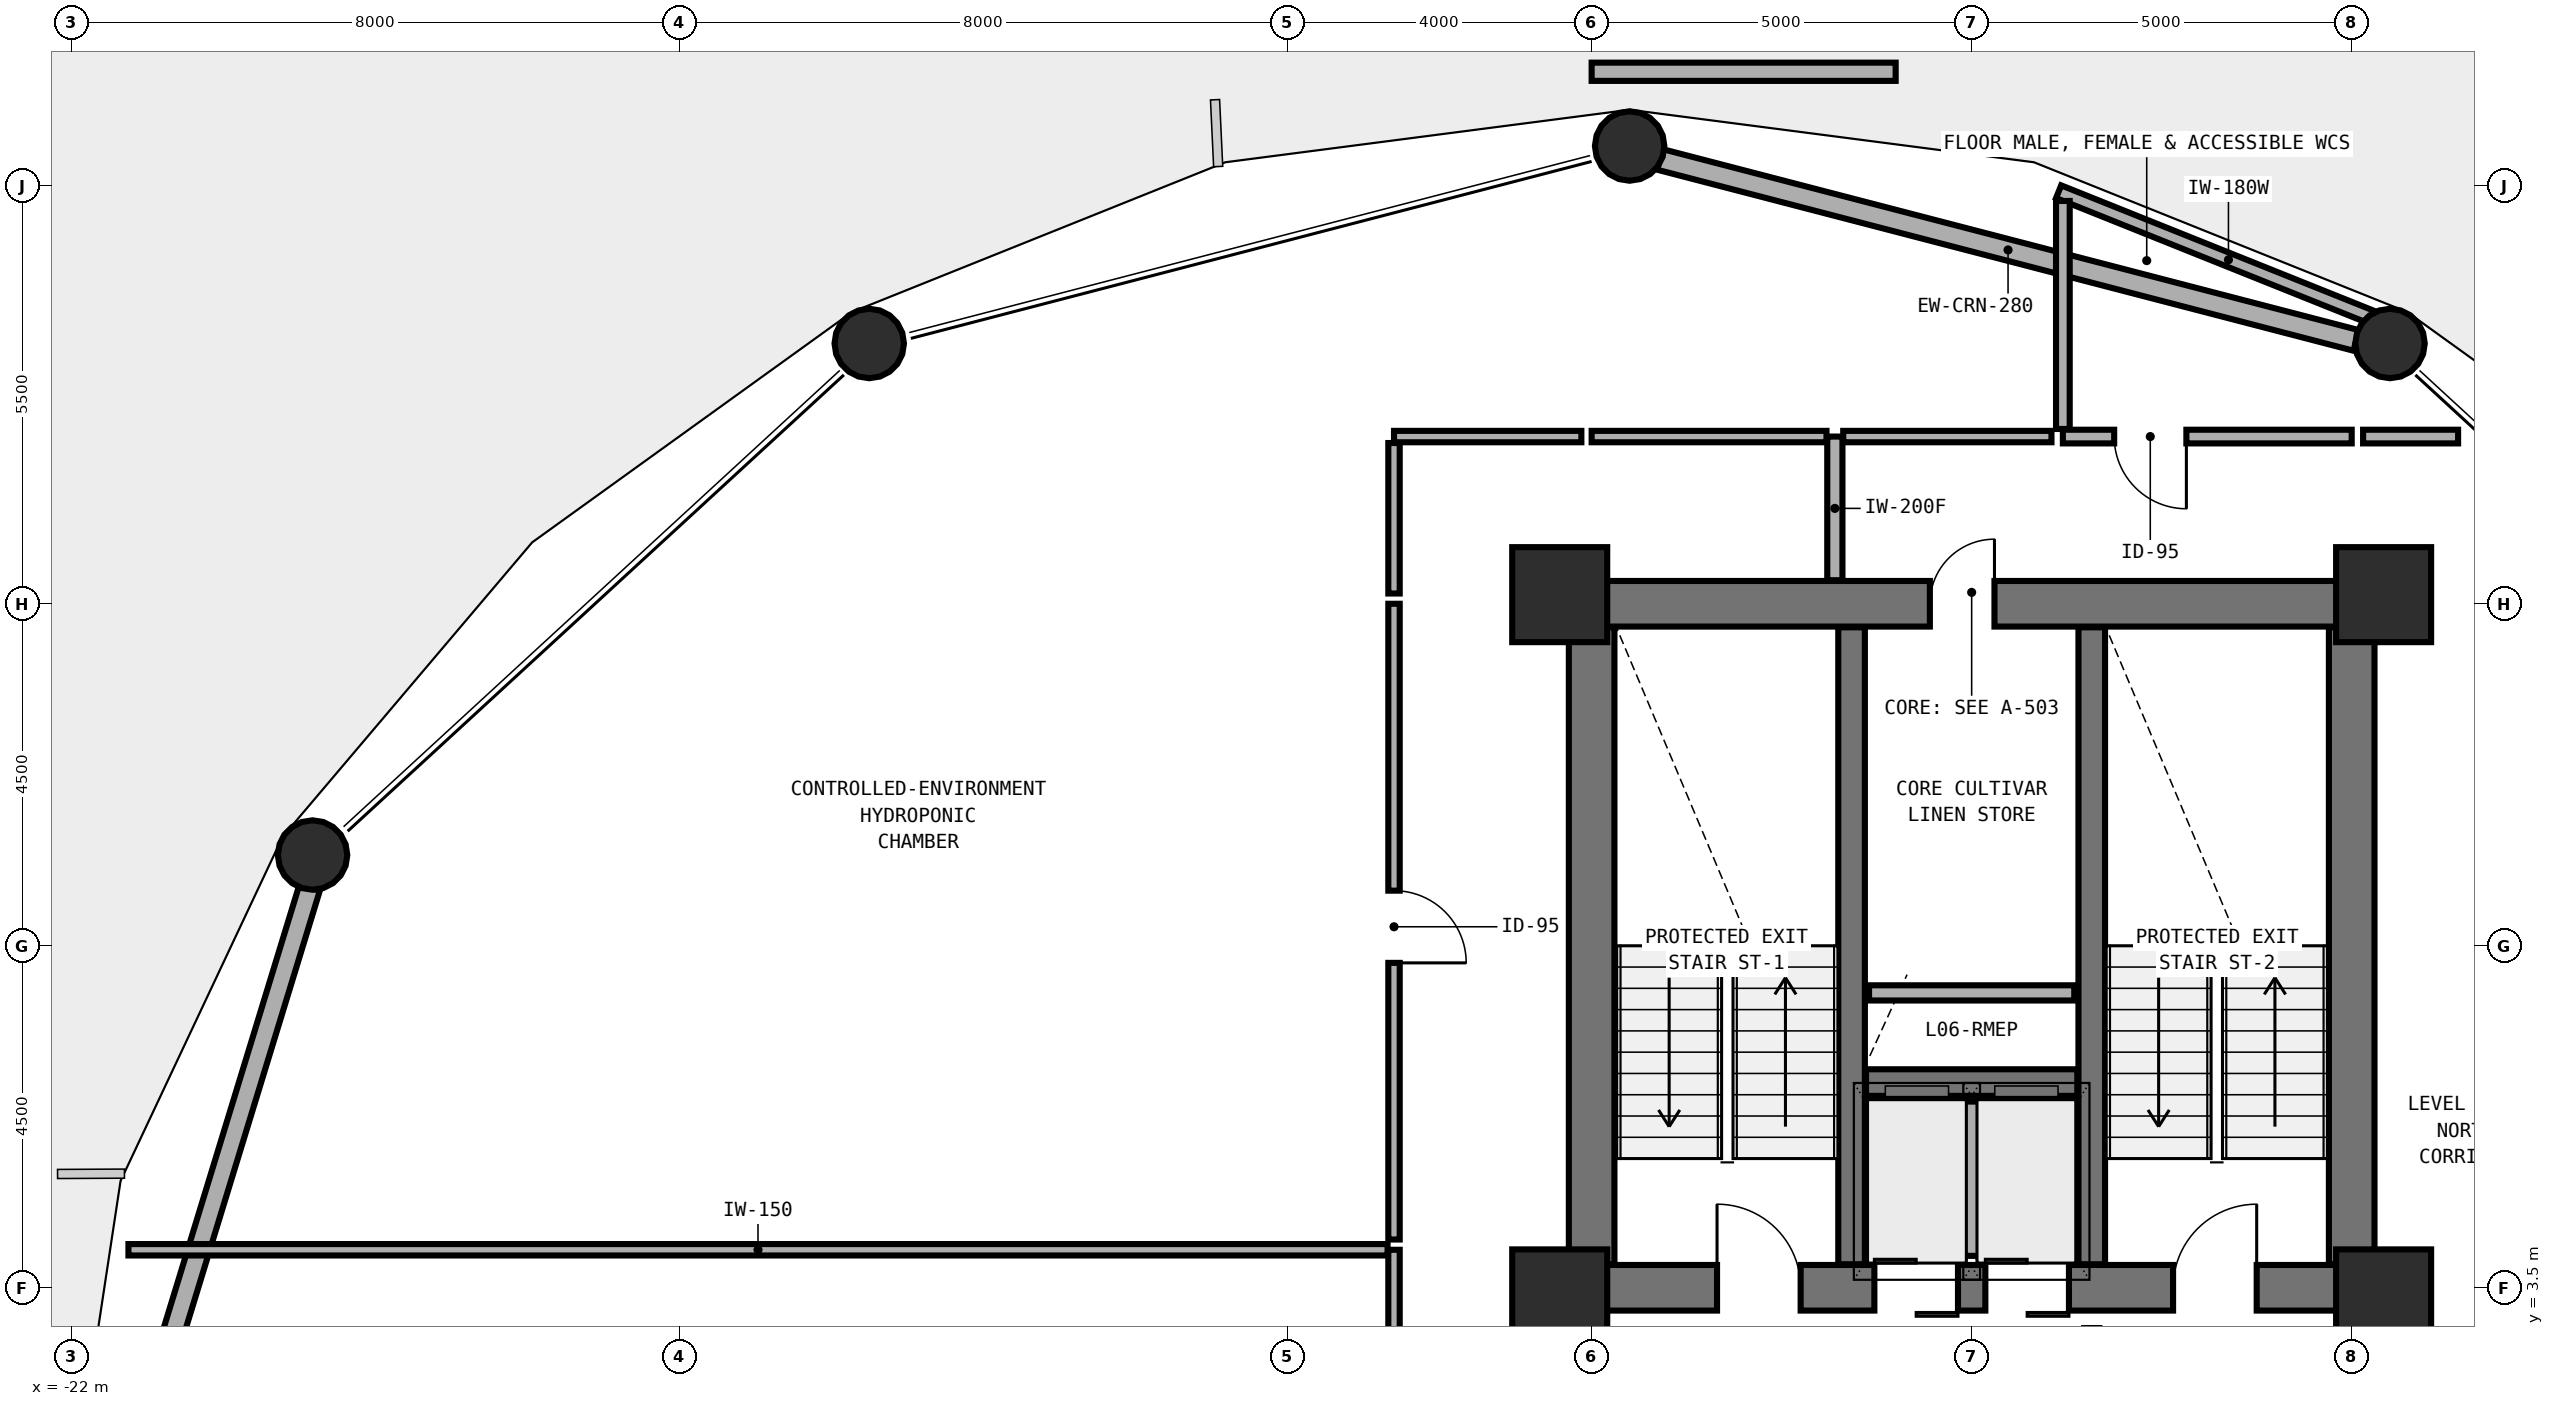
"""IFC4 building model, lengths in metres.
Left out: names, types, materials, properties, quantities, classifications, styles, units other than length and angle.
Written with IfcOpenShell. Run it as: python <this file> out.ifc"""

import sys

from ifc_helpers import new_model, si_unit, direction, frame, frame_2d, origin, origin_2d, place, context, subcontext, project, spatial, rectangle, hollow_circle, extrude, element, fill, save


model = new_model("IFC4")
c1 = context("Model", 3, precision=1e-05, world=origin(), true_north=direction((0.0, 1.0)))
c2 = subcontext(c1, "Body", "Model", "MODEL_VIEW")
j1 = project(units=[si_unit("LENGTHUNIT", "METRE"), si_unit("PLANEANGLEUNIT", "RADIAN")], contexts=[c1])
p1 = place(None, origin())
s1 = spatial("IfcSite", under=j1, at=p1, CompositionType="ELEMENT")
p2 = place(p1, origin())
s2 = spatial("IfcBuilding", under=s1, at=p2, CompositionType="ELEMENT")
p3 = place(p2, frame((0.0, 0.0, 27.6)))
s3 = spatial("IfcBuildingStorey", under=s2, at=p3, CompositionType="ELEMENT", Elevation=27.6)
p4 = place(p3, frame((-2.0, 3.5, 0.0), z_axis=(0.0, 0.0, 1.0), x_axis=(1.0, 0.0, 0.0)))
e1 = element("IfcWall", 1, at=p4, inside=s3, PredefinedType="SHEAR", context=c2, shape_type="SweptSolid", body=[
    extrude(rectangle(XDim=10.0, YDim=0.6, at=frame_2d((5.0, 0.0))), origin(), (0.0, 0.0, 1.0), 3.892),
])
p5 = place(p4, frame((1.65, 0.0, 0.0)))
e2 = element("IfcOpeningElement", 2, at=p5, cuts=e1, PredefinedType="OPENING", context=c2, shape_type="SweptSolid", body=[
    extrude(rectangle(XDim=1.1, YDim=2.15, at=frame_2d((0.55, 1.075))), frame((0.0, 0.31, 0.0), z_axis=(0.0, -1.0, 0.0), x_axis=(1.0, 0.0, 0.0)), (0.0, 0.0, 1.0), 0.62),
])
p6 = place(p4, frame((7.65, 0.0, 0.0)))
e3 = element("IfcOpeningElement", 3, at=p6, cuts=e1, PredefinedType="OPENING", context=c2, shape_type="SweptSolid", body=[
    extrude(rectangle(XDim=1.1, YDim=2.15, at=frame_2d((0.55, 1.075))), frame((0.0, 0.31, 0.0), z_axis=(0.0, -1.0, 0.0), x_axis=(1.0, 0.0, 0.0)), (0.0, 0.0, 1.0), 0.62),
])
p7 = place(p4, frame((3.72, 0.0, 0.0)))
e4 = element("IfcOpeningElement", 4, at=p7, cuts=e1, PredefinedType="OPENING", context=c2, shape_type="SweptSolid", body=[
    extrude(rectangle(XDim=1.1, YDim=2.2, at=frame_2d((0.55, 1.1))), frame((0.0, 0.31, 0.0), z_axis=(0.0, -1.0, 0.0), x_axis=(1.0, 0.0, 0.0)), (0.0, 0.0, 1.0), 0.62),
])
p8 = place(p4, frame((5.18, 0.0, 0.0)))
e5 = element("IfcOpeningElement", 5, at=p8, cuts=e1, PredefinedType="OPENING", context=c2, shape_type="SweptSolid", body=[
    extrude(rectangle(XDim=1.1, YDim=2.2, at=frame_2d((0.55, 1.1))), frame((0.0, 0.31, 0.0), z_axis=(0.0, -1.0, 0.0), x_axis=(1.0, 0.0, 0.0)), (0.0, 0.0, 1.0), 0.62),
])
p9 = place(p3, frame((-2.0, 12.5, 0.0), z_axis=(0.0, 0.0, 1.0), x_axis=(1.0, 0.0, 0.0)))
e6 = element("IfcWall", 6, at=p9, inside=s3, PredefinedType="SHEAR", context=c2, shape_type="SweptSolid", body=[
    extrude(rectangle(XDim=10.0, YDim=0.6, at=frame_2d((5.0, 0.0))), origin(), (0.0, 0.0, 1.0), 3.892),
])
p10 = place(p9, frame((4.45, 0.0, 0.0)))
e7 = element("IfcOpeningElement", 7, at=p10, cuts=e6, PredefinedType="OPENING", context=c2, shape_type="SweptSolid", body=[
    extrude(rectangle(XDim=0.85, YDim=2.1, at=frame_2d((0.425, 1.05))), frame((0.0, 0.31, 0.0), z_axis=(0.0, -1.0, 0.0), x_axis=(1.0, 0.0, 0.0)), (0.0, 0.0, 1.0), 0.62),
])
for number, where, z_axis, x_axis in (
    (8, (-2.0, 3.81, 0.0), (0.0, 0.0, 1.0), (0.0, 1.0, 0.0)),
    (9, (8.0, 3.81, 0.0), (0.0, 0.0, 1.0), (0.0, 1.0, 0.0)),
):
    element("IfcWall", number, at=place(p3, frame(where, z_axis=z_axis, x_axis=x_axis)), inside=s3, PredefinedType="SHEAR", context=c2, shape_type="SweptSolid", body=[
        extrude(rectangle(XDim=8.38, YDim=0.6, at=frame_2d((4.19, 0.0))), origin(), (0.0, 0.0, 1.0), 3.892),
    ])
for number, where, z_axis, x_axis in (
    (10, (1.42, 3.81, 0.0), (0.0, 0.0, 1.0), (0.0, 1.0, 0.0)),
    (11, (4.58, 3.81, 0.0), (0.0, 0.0, 1.0), (0.0, 1.0, 0.0)),
):
    element("IfcWall", number, at=place(p3, frame(where, z_axis=z_axis, x_axis=x_axis)), inside=s3, PredefinedType="SHEAR", context=c2, shape_type="SweptSolid", body=[
        extrude(rectangle(XDim=8.38, YDim=0.35, at=frame_2d((4.19, 0.0))), origin(), (0.0, 0.0, 1.0), 3.892),
    ])
p11 = place(p3, frame((1.61, 6.2, 0.0), z_axis=(0.0, 0.0, 1.0), x_axis=(1.0, 0.0, 0.0)))
e12 = element("IfcWall", 12, at=p11, inside=s3, PredefinedType="SHEAR", context=c2, shape_type="SweptSolid", body=[
    extrude(rectangle(XDim=2.78, YDim=0.35, at=frame_2d((1.39, 0.0))), origin(), (0.0, 0.0, 1.0), 3.892),
])
for number, where, z_axis, x_axis in (
    (13, (-2.42, 12.62, 0.0), (0.0, 0.0, 1.0), (1.0, 0.0, 0.0)),
    (14, (8.42, 12.62, 0.0), (0.0, 0.0, 1.0), (1.0, 0.0, 0.0)),
    (15, (-2.42, 3.38, 0.0), (0.0, 0.0, 1.0), (1.0, 0.0, 0.0)),
    (16, (8.42, 3.38, 0.0), (0.0, 0.0, 1.0), (1.0, 0.0, 0.0)),
):
    element("IfcColumn", number, at=place(p3, frame(where, z_axis=z_axis, x_axis=x_axis)), inside=s3, PredefinedType="COLUMN", context=c2, shape_type="SweptSolid", body=[
        extrude(rectangle(XDim=1.25, YDim=1.25, at=origin_2d()), origin(), (0.0, 0.0, 1.0), 3.875),
    ])
p12 = place(p3, frame((8.458, 15.861, 0.0), z_axis=(0.024236523215, 0.032609140326, 0.999174276545), x_axis=(-0.802595483818, 0.596523670406, 0.0)))
e17 = element("IfcColumn", 17, at=p12, inside=s3, PredefinedType="COLUMN", context=c2, shape_type="SweptSolid", body=[
    extrude(hollow_circle(Radius=0.457, WallThickness=0.032, at=origin_2d()), origin(), (0.0, 0.0, 1.0), 3.878),
])
p13 = place(p3, frame((-1.5, 18.45, 0.0), z_axis=(0.0, 0.037649698668, 0.999290998754), x_axis=(-1.0, 0.0, 0.0)))
e18 = element("IfcColumn", 18, at=p13, inside=s3, PredefinedType="COLUMN", context=c2, shape_type="SweptSolid", body=[
    extrude(hollow_circle(Radius=0.457, WallThickness=0.032, at=origin_2d()), origin(), (0.0, 0.0, 1.0), 3.878),
])
p14 = place(p3, frame((-11.458, 15.861, 0.0), z_axis=(-0.024236523215, 0.032609140326, 0.999174276545), x_axis=(-0.802595483818, -0.596523670406, 0.0)))
e19 = element("IfcColumn", 19, at=p14, inside=s3, PredefinedType="COLUMN", context=c2, shape_type="SweptSolid", body=[
    extrude(hollow_circle(Radius=0.457, WallThickness=0.032, at=origin_2d()), origin(), (0.0, 0.0, 1.0), 3.878),
])
p15 = place(p3, frame((-18.747, 9.157, 0.0), z_axis=(-0.041979196917, 0.018818260687, 0.998941249569), x_axis=(-0.409055904093, -0.912509324515, 0.0)))
e20 = element("IfcColumn", 20, at=p15, inside=s3, PredefinedType="COLUMN", context=c2, shape_type="SweptSolid", body=[
    extrude(hollow_circle(Radius=0.457, WallThickness=0.032, at=origin_2d()), origin(), (0.0, 0.0, 1.0), 3.879),
])
p16 = place(p3, frame((-2.0, 19.5, 0.0), z_axis=(0.0, 0.0, 1.0), x_axis=(1.0, 0.0, 0.0)))
e21 = element("IfcWall", 21, at=p16, inside=s3, PredefinedType="PARAPET", context=c2, shape_type="SweptSolid", body=[
    extrude(rectangle(XDim=4.0, YDim=0.24, at=frame_2d((2.0, 0.0))), origin(), (0.0, 0.0, 1.0), 0.55),
])
p17 = place(p3, frame((-1.101, 18.346, 0.0), z_axis=(0.0, 0.0, 1.0), x_axis=(0.967836325918, -0.251580695274, 0.0)))
e22 = element("IfcWall", 22, at=p17, inside=s3, PredefinedType="SOLIDWALL", context=c2, shape_type="SweptSolid", body=[
    extrude(rectangle(XDim=9.465, YDim=0.28, at=frame_2d((4.732, 0.0))), origin(), (0.0, 0.0, 1.0), 3.06),
])
p18 = place(p3, frame((-21.429, 0.394, 0.0), z_axis=(0.0, 0.0, 1.0), x_axis=(0.292709587844, 0.956201389449, 0.0)))
e23 = element("IfcWall", 23, at=p18, inside=s3, PredefinedType="SOLIDWALL", context=c2, shape_type="SweptSolid", body=[
    extrude(rectangle(XDim=8.753, YDim=0.28, at=frame_2d((4.376, 0.0))), origin(), (0.0, 0.0, 1.0), 3.06),
])
p19 = place(p3, frame((3.0, 3.92, 0.0), z_axis=(0.0, 0.0, 1.0), x_axis=(0.0, 1.0, 0.0)))
e24 = element("IfcWall", 24, at=p19, inside=s3, PredefinedType="SOLIDWALL", context=c2, shape_type="SweptSolid", body=[
    extrude(rectangle(XDim=2.03, YDim=0.2, at=frame_2d((1.015, 0.0))), origin(), (0.0, 0.0, 1.0), 3.64),
])
p20 = place(p3, frame((1.65, 7.38, 0.0), z_axis=(0.0, 0.0, 1.0), x_axis=(1.0, 0.0, 0.0)))
e25 = element("IfcWall", 25, at=p20, inside=s3, PredefinedType="SOLIDWALL", context=c2, shape_type="SweptSolid", body=[
    extrude(rectangle(XDim=2.7, YDim=0.2, at=frame_2d((1.35, 0.0))), origin(), (0.0, 0.0, 1.0), 3.64),
])
p21 = place(p3, frame((8.0, 14.7, 0.0), z_axis=(0.0, 0.0, 1.0), x_axis=(-1.0, 0.0, 0.0)))
e26 = element("IfcWall", 26, at=p21, inside=s3, PredefinedType="PLUMBINGWALL", context=c2, shape_type="SweptSolid", body=[
    extrude(rectangle(XDim=3.8, YDim=0.18, at=frame_2d((1.9, 0.0))), origin(), (0.0, 0.0, 1.0), 3.122),
])
p22 = place(p21, frame((2.175, 0.0, 0.0)))
e27 = element("IfcOpeningElement", 27, at=p22, cuts=e26, PredefinedType="OPENING", context=c2, shape_type="SweptSolid", body=[
    extrude(rectangle(XDim=0.95, YDim=2.1, at=frame_2d((0.475, 1.05))), frame((0.0, 0.1, 0.0), z_axis=(0.0, -1.0, 0.0), x_axis=(1.0, 0.0, 0.0)), (0.0, 0.0, 1.0), 0.2),
])
p23 = place(p3, frame((-4.6, 4.0, 0.0), z_axis=(0.0, 0.0, 1.0), x_axis=(0.0, -1.0, 0.0)))
e28 = element("IfcWall", 28, at=p23, inside=s3, PredefinedType="PARTITIONING", context=c2, shape_type="SweptSolid", body=[
    extrude(rectangle(XDim=10.6, YDim=0.15, at=frame_2d((5.3, 0.0))), origin(), (0.0, 0.0, 1.0), 3.64),
])
p24 = place(p23, frame((4.825, 0.0, 0.0)))
e29 = element("IfcOpeningElement", 29, at=p24, cuts=e28, PredefinedType="OPENING", context=c2, shape_type="SweptSolid", body=[
    extrude(rectangle(XDim=0.95, YDim=2.1, at=frame_2d((0.475, 1.05))), frame((0.0, 0.085, 0.0), z_axis=(0.0, -1.0, 0.0), x_axis=(1.0, 0.0, 0.0)), (0.0, 0.0, 1.0), 0.17),
])
p25 = place(p3, frame((-4.6, 12.5, 0.0), z_axis=(0.0, 0.0, 1.0), x_axis=(0.0, -1.0, 0.0)))
e30 = element("IfcWall", 30, at=p25, inside=s3, PredefinedType="PARTITIONING", context=c2, shape_type="SweptSolid", body=[
    extrude(rectangle(XDim=8.365, YDim=0.15, at=frame_2d((4.183, 0.0))), origin(), (0.0, 0.0, 1.0), 3.64),
])
p26 = place(p25, frame((3.775, 0.0, 0.0)))
e31 = element("IfcOpeningElement", 31, at=p26, cuts=e30, PredefinedType="OPENING", context=c2, shape_type="SweptSolid", body=[
    extrude(rectangle(XDim=0.95, YDim=2.1, at=frame_2d((0.475, 1.05))), frame((0.0, 0.085, 0.0), z_axis=(0.0, -1.0, 0.0), x_axis=(1.0, 0.0, 0.0)), (0.0, 0.0, 1.0), 0.17),
])
p27 = place(p3, frame((1.2, 14.7, 0.0), z_axis=(0.0, 0.0, 1.0), x_axis=(0.0, -1.0, 0.0)))
e32 = element("IfcWall", 32, at=p27, inside=s3, PredefinedType="MOVABLE", context=c2, shape_type="SweptSolid", body=[
    extrude(rectangle(XDim=1.89, YDim=0.2, at=frame_2d((0.945, 0.0))), origin(), (0.0, 0.0, 1.0), 3.64),
])
p28 = place(p3, frame((9.4, 14.7, 0.0), z_axis=(0.0, 0.0, 1.0), x_axis=(-1.0, 0.0, 0.0)))
e33 = element("IfcWall", 33, at=p28, inside=s3, PredefinedType="PLUMBINGWALL", context=c2, shape_type="SweptSolid", body=[
    extrude(rectangle(XDim=1.25, YDim=0.18, at=frame_2d((0.625, 0.0))), origin(), (0.0, 0.0, 1.0), 3.122),
])
p29 = place(p3, frame((-21.251, 4.0, 0.0), z_axis=(0.0, 0.0, 1.0), x_axis=(1.0, 0.0, 0.0)))
e34 = element("IfcWall", 34, at=p29, inside=s3, PredefinedType="PARTITIONING", context=c2, shape_type="SweptSolid", body=[
    extrude(rectangle(XDim=16.566, YDim=0.15, at=frame_2d((8.283, 0.0))), origin(), (0.0, 0.0, 1.0), 3.64),
])
p30 = place(p3, frame((1.09, 14.7, 0.0), z_axis=(0.0, 0.0, 1.0), x_axis=(-1.0, 0.0, 0.0)))
e35 = element("IfcWall", 35, at=p30, inside=s3, PredefinedType="PARTITIONING", context=c2, shape_type="SweptSolid", body=[
    extrude(rectangle(XDim=3.09, YDim=0.15, at=frame_2d((1.545, 0.0))), origin(), (0.0, 0.0, 1.0), 3.122),
])
p31 = place(p3, frame((-2.135, 14.7, 0.0), z_axis=(0.0, 0.0, 1.0), x_axis=(-1.0, 0.0, 0.0)))
e36 = element("IfcWall", 36, at=p31, inside=s3, PredefinedType="PARTITIONING", context=c2, shape_type="SweptSolid", body=[
    extrude(rectangle(XDim=2.465, YDim=0.15, at=frame_2d((1.232, 0.0))), origin(), (0.0, 0.0, 1.0), 3.122),
])
p32 = place(p3, frame((-4.6, 14.615, 0.0), z_axis=(0.0, 0.0, 1.0), x_axis=(0.0, -1.0, 0.0)))
e37 = element("IfcWall", 37, at=p32, inside=s3, PredefinedType="PARTITIONING", context=c2, shape_type="SweptSolid", body=[
    extrude(rectangle(XDim=1.98, YDim=0.15, at=frame_2d((0.99, 0.0))), origin(), (0.0, 0.0, 1.0), 3.64),
])
p33 = place(p3, frame((4.05, 14.7, 0.0), z_axis=(0.0, 0.0, 1.0), x_axis=(-1.0, 0.0, 0.0)))
e38 = element("IfcWall", 38, at=p33, inside=s3, PredefinedType="PARTITIONING", context=c2, shape_type="SweptSolid", body=[
    extrude(rectangle(XDim=2.74, YDim=0.15, at=frame_2d((1.37, 0.0))), origin(), (0.0, 0.0, 1.0), 3.122),
])
p34 = place(p3, frame((4.144, 17.922, 0.0), z_axis=(0.0, 0.0, 1.0), x_axis=(0.928144118183, -0.372221030952, 0.0)))
e39 = element("IfcWall", 39, at=p34, inside=s3, PredefinedType="PLUMBINGWALL", context=c2, shape_type="SweptSolid", body=[
    extrude(rectangle(XDim=4.815, YDim=0.18, at=frame_2d((2.407, 0.0))), origin(), (0.0, 0.0, 1.0), 3.072),
])
p35 = place(p3, frame((4.2, 17.8, 0.0), z_axis=(0.0, 0.0, 1.0), x_axis=(0.0, -1.0, 0.0)))
e40 = element("IfcWall", 40, at=p35, inside=s3, PredefinedType="PLUMBINGWALL", context=c2, shape_type="SweptSolid", body=[
    extrude(rectangle(XDim=3.0, YDim=0.18, at=frame_2d((1.5, 0.0))), origin(), (0.0, 0.0, 1.0), 3.64),
])
p36 = place(p5, origin())
e41 = element("IfcDoor", 41, at=p36, inside=s3, OperationType="SINGLE_SWING_LEFT", PredefinedType="DOOR", context=c2, shape_type="SweptSolid", body=[
    extrude(rectangle(XDim=1.1, YDim=2.15, at=frame_2d((0.55, 1.075))), frame((0.0, 0.025, 0.0), z_axis=(0.0, -1.0, 0.0), x_axis=(1.0, 0.0, 0.0)), (0.0, 0.0, 1.0), 0.05),
])
fill(e2, e41)
p37 = place(p6, origin())
e42 = element("IfcDoor", 42, at=p37, inside=s3, OperationType="SINGLE_SWING_RIGHT", PredefinedType="DOOR", context=c2, shape_type="SweptSolid", body=[
    extrude(rectangle(XDim=1.1, YDim=2.15, at=frame_2d((0.55, 1.075))), frame((0.0, 0.025, 0.0), z_axis=(0.0, -1.0, 0.0), x_axis=(1.0, 0.0, 0.0)), (0.0, 0.0, 1.0), 0.05),
])
fill(e3, e42)
p38 = place(p7, origin())
e43 = element("IfcDoor", 43, at=p38, inside=s3, OperationType="DOUBLE_DOOR_SLIDING", PredefinedType="DOOR", context=c2, shape_type="SweptSolid", body=[
    extrude(rectangle(XDim=1.1, YDim=2.2, at=frame_2d((0.55, 1.1))), frame((0.0, 0.025, 0.0), z_axis=(0.0, -1.0, 0.0), x_axis=(1.0, 0.0, 0.0)), (0.0, 0.0, 1.0), 0.05),
])
fill(e4, e43)
p39 = place(p8, origin())
e44 = element("IfcDoor", 44, at=p39, inside=s3, OperationType="DOUBLE_DOOR_SLIDING", PredefinedType="DOOR", context=c2, shape_type="SweptSolid", body=[
    extrude(rectangle(XDim=1.1, YDim=2.2, at=frame_2d((0.55, 1.1))), frame((0.0, 0.025, 0.0), z_axis=(0.0, -1.0, 0.0), x_axis=(1.0, 0.0, 0.0)), (0.0, 0.0, 1.0), 0.05),
])
fill(e5, e44)
p40 = place(p10, origin())
e45 = element("IfcDoor", 45, at=p40, inside=s3, OperationType="SINGLE_SWING_RIGHT", PredefinedType="DOOR", context=c2, shape_type="SweptSolid", body=[
    extrude(rectangle(XDim=0.85, YDim=2.1, at=frame_2d((0.425, 1.05))), frame((0.0, 0.025, 0.0), z_axis=(0.0, -1.0, 0.0), x_axis=(1.0, 0.0, 0.0)), (0.0, 0.0, 1.0), 0.05),
])
fill(e7, e45)
p41 = place(p22, origin())
e46 = element("IfcDoor", 46, at=p41, inside=s3, OperationType="SINGLE_SWING_LEFT", PredefinedType="DOOR", context=c2, shape_type="SweptSolid", body=[
    extrude(rectangle(XDim=0.95, YDim=2.1, at=frame_2d((0.475, 1.05))), frame((0.0, 0.025, 0.0), z_axis=(0.0, -1.0, 0.0), x_axis=(1.0, 0.0, 0.0)), (0.0, 0.0, 1.0), 0.05),
])
fill(e27, e46)
p42 = place(p26, origin())
e47 = element("IfcDoor", 47, at=p42, inside=s3, OperationType="SINGLE_SWING_RIGHT", PredefinedType="DOOR", context=c2, shape_type="SweptSolid", body=[
    extrude(rectangle(XDim=0.95, YDim=2.1, at=frame_2d((0.475, 1.05))), frame((0.0, 0.025, 0.0), z_axis=(0.0, -1.0, 0.0), x_axis=(1.0, 0.0, 0.0)), (0.0, 0.0, 1.0), 0.05),
])
fill(e31, e47)
save(model, sys.argv[1])
